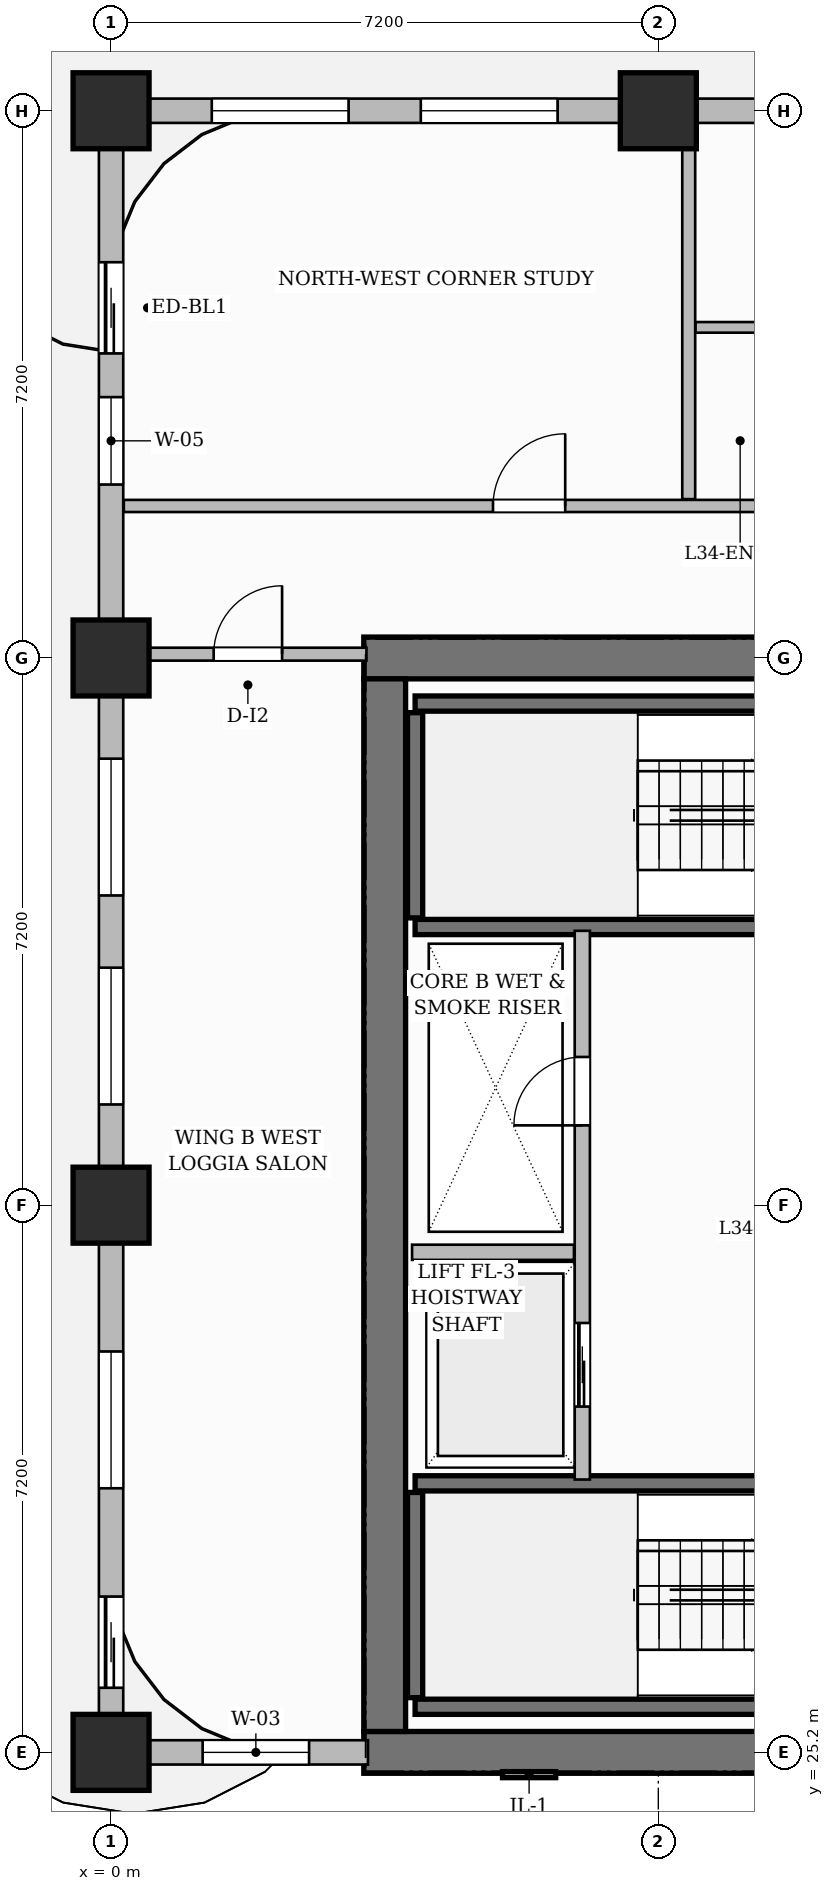
"""IFC4 building model, lengths in metres.
Left out: names, types, materials, properties, quantities, classifications, styles, units other than length and angle.
Written with IfcOpenShell. Run it as: python <this file> out.ifc"""

import sys

from ifc_helpers import new_model, si_unit, direction, frame, frame_2d, origin, origin_2d, place, context, subcontext, project, spatial, rectangle, extrude, source, transform, mapped, element, fill, save


model = new_model("IFC4")
c1 = context("Model", 3, precision=1e-05, world=origin(), true_north=direction((0.0, 1.0)))
c2 = subcontext(c1, "Body", "Model", "MODEL_VIEW")
j1 = project(units=[si_unit("LENGTHUNIT", "METRE"), si_unit("PLANEANGLEUNIT", "RADIAN")], contexts=[c1])
p1 = place(None, origin())
s1 = spatial("IfcSite", under=j1, at=p1, CompositionType="ELEMENT")
p2 = place(p1, origin())
s2 = spatial("IfcBuilding", under=s1, at=p2, CompositionType="ELEMENT")
p3 = place(p2, frame((0.0, 0.0, 137.7)))
s3 = spatial("IfcBuildingStorey", under=s2, at=p3, CompositionType="ELEMENT", Elevation=137.7)
for number, where, z_axis, x_axis in (
    (1, (3.325, 25.2, 0.0), (0.0, 0.0, 1.0), (1.0, 0.0, 0.0)),
    (2, (3.325, 39.6, 0.0), (0.0, 0.0, 1.0), (1.0, 0.0, 0.0)),
):
    element("IfcWall", number, at=place(p3, frame(where, z_axis=z_axis, x_axis=x_axis)), inside=s3, PredefinedType="SHEAR", context=c2, shape_type="SweptSolid", body=[
        extrude(rectangle(XDim=8.35, YDim=0.55, at=frame_2d((4.175, 0.0))), origin(), (0.0, 0.0, 1.0), 3.7),
    ])
p4 = place(p3, frame((3.6, 25.475, 0.0), z_axis=(0.0, 0.0, 1.0), x_axis=(0.0, 1.0, 0.0)))
e3 = element("IfcWall", 3, at=p4, inside=s3, PredefinedType="SHEAR", context=c2, shape_type="SweptSolid", body=[
    extrude(rectangle(XDim=13.85, YDim=0.55, at=frame_2d((6.925, 0.0))), origin(), (0.0, 0.0, 1.0), 3.7),
])
m1 = source(origin(), c2, "Body", "SweptSolid", [
    extrude(rectangle(XDim=1.0, YDim=1.0, at=origin_2d()), origin(), (0.0, 0.0, 1.0), 3.7),
])
for number, where, z_axis, x_axis in (
    (4, (0.0, 25.2, 0.0), (0.0, 0.0, 1.0), (1.0, 0.0, 0.0)),
    (5, (0.0, 32.4, 0.0), (0.0, 0.0, 1.0), (1.0, 0.0, 0.0)),
    (6, (0.0, 39.6, 0.0), (0.0, 0.0, 1.0), (1.0, 0.0, 0.0)),
    (7, (0.0, 46.8, 0.0), (0.0, 0.0, 1.0), (1.0, 0.0, 0.0)),
    (8, (7.2, 46.8, 0.0), (0.0, 0.0, 1.0), (1.0, 0.0, 0.0)),
):
    element("IfcColumn", number, at=place(p3, frame(where, z_axis=z_axis, x_axis=x_axis)), inside=s3, PredefinedType="COLUMN", context=c2, shape_type="MappedRepresentation", body=[
        mapped(m1, transform((0.0, 0.0, 0.0), scale=1.0)),
    ])
p5 = place(p3, frame((4.0, 25.8, 0.0), z_axis=(0.0, 0.0, 1.0), x_axis=(1.0, 0.0, 0.0)))
e9 = element("IfcWall", 9, at=p5, inside=s3, PredefinedType="SHEAR", context=c2, shape_type="SweptSolid", body=[
    extrude(rectangle(XDim=7.1, YDim=0.2, at=frame_2d((3.55, 0.0))), origin(), (0.0, 0.0, 1.0), 3.7),
])
p6 = place(p3, frame((4.0, 25.92, 0.0), z_axis=(0.0, 0.0, 1.0), x_axis=(0.0, 1.0, 0.0)))
e10 = element("IfcWall", 10, at=p6, inside=s3, PredefinedType="SHEAR", context=c2, shape_type="SweptSolid", body=[
    extrude(rectangle(XDim=2.7, YDim=0.2, at=frame_2d((1.35, 0.0))), origin(), (0.0, 0.0, 1.0), 3.7),
])
p7 = place(p3, frame((4.0, 28.74, 0.0), z_axis=(0.0, 0.0, 1.0), x_axis=(1.0, 0.0, 0.0)))
e11 = element("IfcWall", 11, at=p7, inside=s3, PredefinedType="SHEAR", context=c2, shape_type="SweptSolid", body=[
    extrude(rectangle(XDim=7.1, YDim=0.2, at=frame_2d((3.55, 0.0))), origin(), (0.0, 0.0, 1.0), 3.7),
])
p8 = place(p7, frame((5.815, 0.0, 0.0)))
e12 = element("IfcOpeningElement", 12, at=p8, cuts=e11, PredefinedType="OPENING", context=c2, shape_type="SweptSolid", body=[
    extrude(rectangle(XDim=1.05, YDim=2.2, at=frame_2d((0.525, 1.1))), frame((0.0, 0.11, 0.0), z_axis=(0.0, -1.0, 0.0), x_axis=(1.0, 0.0, 0.0)), (0.0, 0.0, 1.0), 0.22),
])
p9 = place(p3, frame((4.0, 39.0, 0.0), z_axis=(0.0, 0.0, 1.0), x_axis=(1.0, 0.0, 0.0)))
e13 = element("IfcWall", 13, at=p9, inside=s3, PredefinedType="SHEAR", context=c2, shape_type="SweptSolid", body=[
    extrude(rectangle(XDim=7.1, YDim=0.2, at=frame_2d((3.55, 0.0))), origin(), (0.0, 0.0, 1.0), 3.7),
])
p10 = place(p3, frame((4.0, 36.18, 0.0), z_axis=(0.0, 0.0, 1.0), x_axis=(0.0, 1.0, 0.0)))
e14 = element("IfcWall", 14, at=p10, inside=s3, PredefinedType="SHEAR", context=c2, shape_type="SweptSolid", body=[
    extrude(rectangle(XDim=2.7, YDim=0.2, at=frame_2d((1.35, 0.0))), origin(), (0.0, 0.0, 1.0), 3.7),
])
p11 = place(p3, frame((4.0, 36.06, 0.0), z_axis=(0.0, 0.0, 1.0), x_axis=(1.0, 0.0, 0.0)))
e15 = element("IfcWall", 15, at=p11, inside=s3, PredefinedType="SHEAR", context=c2, shape_type="SweptSolid", body=[
    extrude(rectangle(XDim=7.1, YDim=0.2, at=frame_2d((3.55, 0.0))), origin(), (0.0, 0.0, 1.0), 3.7),
])
p12 = place(p11, frame((5.815, 0.0, 0.0)))
e16 = element("IfcOpeningElement", 16, at=p12, cuts=e15, PredefinedType="OPENING", context=c2, shape_type="SweptSolid", body=[
    extrude(rectangle(XDim=1.05, YDim=2.2, at=frame_2d((0.525, 1.1))), frame((0.0, 0.11, 0.0), z_axis=(0.0, -1.0, 0.0), x_axis=(1.0, 0.0, 0.0)), (0.0, 0.0, 1.0), 0.22),
])
p13 = place(p3, frame((6.2, 28.79, 0.0), z_axis=(0.0, 0.0, 1.0), x_axis=(0.0, 1.0, 0.0)))
e17 = element("IfcWall", 17, at=p13, inside=s3, PredefinedType="PARTITIONING", context=c2, shape_type="SweptSolid", body=[
    extrude(rectangle(XDim=7.22, YDim=0.2, at=frame_2d((3.61, 0.0))), origin(), (0.0, 0.0, 1.0), 3.45),
])
p14 = place(p13, frame((4.66, 0.0, 0.0)))
e18 = element("IfcOpeningElement", 18, at=p14, cuts=e17, PredefinedType="OPENING", context=c2, shape_type="SweptSolid", body=[
    extrude(rectangle(XDim=0.9, YDim=2.1, at=frame_2d((0.45, 1.05))), frame((0.0, 0.11, 0.0), z_axis=(0.0, -1.0, 0.0), x_axis=(1.0, 0.0, 0.0)), (0.0, 0.0, 1.0), 0.22),
])
p15 = place(p13, frame((0.96, 0.0, 0.0)))
e19 = element("IfcOpeningElement", 19, at=p15, cuts=e17, PredefinedType="OPENING", context=c2, shape_type="SweptSolid", body=[
    extrude(rectangle(XDim=1.1, YDim=2.2, at=frame_2d((0.55, 1.1))), frame((0.0, 0.11, 0.0), z_axis=(0.0, -1.0, 0.0), x_axis=(1.0, 0.0, 0.0)), (0.0, 0.0, 1.0), 0.22),
])
p16 = place(p3, frame((3.96, 31.78, 0.0), z_axis=(0.0, 0.0, 1.0), x_axis=(1.0, 0.0, 0.0)))
e20 = element("IfcWall", 20, at=p16, inside=s3, PredefinedType="PARTITIONING", context=c2, shape_type="SweptSolid", body=[
    extrude(rectangle(XDim=2.13, YDim=0.2, at=frame_2d((1.065, 0.0))), origin(), (0.0, 0.0, 1.0), 3.45),
])
p17 = place(p3, frame((0.24, 39.65, 0.0), z_axis=(0.0, 0.0, 1.0), x_axis=(1.0, 0.0, 0.0)))
e21 = element("IfcWall", 21, at=p17, inside=s3, PredefinedType="PARTITIONING", context=c2, shape_type="SweptSolid", body=[
    extrude(rectangle(XDim=3.12, YDim=0.17, at=frame_2d((1.56, 0.0))), origin(), (0.0, 0.0, 1.0), 3.45),
])
p18 = place(p17, frame((1.11, 0.0, 0.0)))
e22 = element("IfcOpeningElement", 22, at=p18, cuts=e21, PredefinedType="OPENING", context=c2, shape_type="SweptSolid", body=[
    extrude(rectangle(XDim=0.9, YDim=2.15, at=frame_2d((0.45, 1.075))), frame((0.0, 0.095, 0.0), z_axis=(0.0, -1.0, 0.0), x_axis=(1.0, 0.0, 0.0)), (0.0, 0.0, 1.0), 0.19),
])
p19 = place(p3, frame((7.6, 41.69, 0.0), z_axis=(0.0, 0.0, 1.0), x_axis=(0.0, 1.0, 0.0)))
e23 = element("IfcWall", 23, at=p19, inside=s3, PredefinedType="PARTITIONING", context=c2, shape_type="SweptSolid", body=[
    extrude(rectangle(XDim=4.87, YDim=0.17, at=frame_2d((2.435, 0.0))), origin(), (0.0, 0.0, 1.0), 3.45),
])
p20 = place(p3, frame((0.168, 41.6, 0.0), z_axis=(0.0, 0.0, 1.0), x_axis=(1.0, 0.0, 0.0)))
e24 = element("IfcWall", 24, at=p20, inside=s3, PredefinedType="PARTITIONING", context=c2, shape_type="SweptSolid", body=[
    extrude(rectangle(XDim=14.792, YDim=0.16, at=frame_2d((7.396, 0.0))), origin(), (0.0, 0.0, 1.0), 2.935),
])
p21 = place(p20, frame((4.857, 0.0, 0.0)))
e25 = element("IfcOpeningElement", 25, at=p21, cuts=e24, PredefinedType="OPENING", context=c2, shape_type="SweptSolid", body=[
    extrude(rectangle(XDim=0.95, YDim=2.15, at=frame_2d((0.475, 1.075))), frame((0.0, 0.09, 0.0), z_axis=(0.0, -1.0, 0.0), x_axis=(1.0, 0.0, 0.0)), (0.0, 0.0, 1.0), 0.18),
])
p22 = place(p3, frame((7.69, 43.95, 0.0), z_axis=(0.0, 0.0, 1.0), x_axis=(1.0, 0.0, 0.0)))
e26 = element("IfcWall", 26, at=p22, inside=s3, PredefinedType="PARTITIONING", context=c2, shape_type="SweptSolid", body=[
    extrude(rectangle(XDim=2.07, YDim=0.14, at=frame_2d((1.035, 0.0))), origin(), (0.0, 0.0, 1.0), 2.935),
])
p23 = place(p3, frame((0.0, 25.2, 0.0), z_axis=(0.0, 0.0, 1.0), x_axis=(1.0, 0.0, 0.0)))
e27 = element("IfcWall", 27, at=p23, inside=s3, PredefinedType="SOLIDWALL", context=c2, shape_type="SweptSolid", body=[
    extrude(rectangle(XDim=3.38, YDim=0.32, at=frame_2d((1.69, 0.0))), origin(), (0.0, 0.0, 1.0), 3.45),
])
p24 = place(p23, frame((1.205, 0.0, 0.8)))
e28 = element("IfcOpeningElement", 28, at=p24, cuts=e27, PredefinedType="OPENING", context=c2, shape_type="SweptSolid", body=[
    extrude(rectangle(XDim=1.4, YDim=1.85, at=frame_2d((0.7, 0.925))), frame((0.0, 0.17, 0.0), z_axis=(0.0, -1.0, 0.0), x_axis=(1.0, 0.0, 0.0)), (0.0, 0.0, 1.0), 0.34),
])
p25 = place(p3, frame((0.0, 25.25, 0.0), z_axis=(0.0, 0.0, 1.0), x_axis=(0.0, 1.0, 0.0)))
e29 = element("IfcWall", 29, at=p25, inside=s3, PredefinedType="SOLIDWALL", context=c2, shape_type="SweptSolid", body=[
    extrude(rectangle(XDim=21.5, YDim=0.32, at=frame_2d((10.75, 0.0))), origin(), (0.0, 0.0, 1.0), 2.935),
])
p26 = place(p25, frame((18.357, 0.0, 0.0)))
e30 = element("IfcOpeningElement", 30, at=p26, cuts=e29, PredefinedType="OPENING", context=c2, shape_type="SweptSolid", body=[
    extrude(rectangle(XDim=1.2, YDim=2.2, at=frame_2d((0.6, 1.1))), frame((0.0, 0.17, 0.0), z_axis=(0.0, -1.0, 0.0), x_axis=(1.0, 0.0, 0.0)), (0.0, 0.0, 1.0), 0.34),
])
p27 = place(p25, frame((0.8, 0.0, 0.0)))
e31 = element("IfcOpeningElement", 31, at=p27, cuts=e29, PredefinedType="OPENING", context=c2, shape_type="SweptSolid", body=[
    extrude(rectangle(XDim=1.2, YDim=2.2, at=frame_2d((0.6, 1.1))), frame((0.0, 0.17, 0.0), z_axis=(0.0, -1.0, 0.0), x_axis=(1.0, 0.0, 0.0)), (0.0, 0.0, 1.0), 0.34),
])
p28 = place(p25, frame((3.425, 0.0, 0.8)))
e32 = element("IfcOpeningElement", 32, at=p28, cuts=e29, PredefinedType="OPENING", context=c2, shape_type="SweptSolid", body=[
    extrude(rectangle(XDim=1.8, YDim=1.85, at=frame_2d((0.9, 0.925))), frame((0.0, 0.17, 0.0), z_axis=(0.0, -1.0, 0.0), x_axis=(1.0, 0.0, 0.0)), (0.0, 0.0, 1.0), 0.34),
])
p29 = place(p25, frame((8.475, 0.0, 0.8)))
e33 = element("IfcOpeningElement", 33, at=p29, cuts=e29, PredefinedType="OPENING", context=c2, shape_type="SweptSolid", body=[
    extrude(rectangle(XDim=1.8, YDim=1.85, at=frame_2d((0.9, 0.925))), frame((0.0, 0.17, 0.0), z_axis=(0.0, -1.0, 0.0), x_axis=(1.0, 0.0, 0.0)), (0.0, 0.0, 1.0), 0.34),
])
p30 = place(p25, frame((11.225, 0.0, 0.8)))
e34 = element("IfcOpeningElement", 34, at=p30, cuts=e29, PredefinedType="OPENING", context=c2, shape_type="SweptSolid", body=[
    extrude(rectangle(XDim=1.8, YDim=1.85, at=frame_2d((0.9, 0.925))), frame((0.0, 0.17, 0.0), z_axis=(0.0, -1.0, 0.0), x_axis=(1.0, 0.0, 0.0)), (0.0, 0.0, 1.0), 0.34),
])
p31 = place(p25, frame((16.632, 0.0, 0.8)))
e35 = element("IfcOpeningElement", 35, at=p31, cuts=e29, PredefinedType="OPENING", context=c2, shape_type="SweptSolid", body=[
    extrude(rectangle(XDim=1.15, YDim=1.8, at=frame_2d((0.575, 0.9))), frame((0.0, 0.17, 0.0), z_axis=(0.0, -1.0, 0.0), x_axis=(1.0, 0.0, 0.0)), (0.0, 0.0, 1.0), 0.34),
])
p32 = place(p3, frame((0.0, 46.8, 0.0), z_axis=(0.0, 0.0, 1.0), x_axis=(1.0, 0.0, 0.0)))
e36 = element("IfcWall", 36, at=p32, inside=s3, PredefinedType="SOLIDWALL", context=c2, shape_type="SweptSolid", body=[
    extrude(rectangle(XDim=18.0, YDim=0.32, at=frame_2d((9.0, 0.0))), origin(), (0.0, 0.0, 1.0), 2.935),
])
p33 = place(p32, frame((1.325, 0.0, 0.8)))
e37 = element("IfcOpeningElement", 37, at=p33, cuts=e36, PredefinedType="OPENING", context=c2, shape_type="SweptSolid", body=[
    extrude(rectangle(XDim=1.8, YDim=1.85, at=frame_2d((0.9, 0.925))), frame((0.0, 0.17, 0.0), z_axis=(0.0, -1.0, 0.0), x_axis=(1.0, 0.0, 0.0)), (0.0, 0.0, 1.0), 0.34),
])
p34 = place(p32, frame((4.075, 0.0, 0.8)))
e38 = element("IfcOpeningElement", 38, at=p34, cuts=e36, PredefinedType="OPENING", context=c2, shape_type="SweptSolid", body=[
    extrude(rectangle(XDim=1.8, YDim=1.85, at=frame_2d((0.9, 0.925))), frame((0.0, 0.17, 0.0), z_axis=(0.0, -1.0, 0.0), x_axis=(1.0, 0.0, 0.0)), (0.0, 0.0, 1.0), 0.34),
])
p35 = place(p32, frame((8.525, 0.0, 0.8)))
e39 = element("IfcOpeningElement", 39, at=p35, cuts=e36, PredefinedType="OPENING", context=c2, shape_type="SweptSolid", body=[
    extrude(rectangle(XDim=1.8, YDim=1.85, at=frame_2d((0.9, 0.925))), frame((0.0, 0.17, 0.0), z_axis=(0.0, -1.0, 0.0), x_axis=(1.0, 0.0, 0.0)), (0.0, 0.0, 1.0), 0.34),
])
p36 = place(p32, frame((11.275, 0.0, 0.8)))
e40 = element("IfcOpeningElement", 40, at=p36, cuts=e36, PredefinedType="OPENING", context=c2, shape_type="SweptSolid", body=[
    extrude(rectangle(XDim=1.8, YDim=1.85, at=frame_2d((0.9, 0.925))), frame((0.0, 0.17, 0.0), z_axis=(0.0, -1.0, 0.0), x_axis=(1.0, 0.0, 0.0)), (0.0, 0.0, 1.0), 0.34),
])
p37 = place(p32, frame((15.5, 0.0, 0.8)))
e41 = element("IfcOpeningElement", 41, at=p37, cuts=e36, PredefinedType="OPENING", context=c2, shape_type="SweptSolid", body=[
    extrude(rectangle(XDim=1.4, YDim=1.85, at=frame_2d((0.7, 0.925))), frame((0.0, 0.17, 0.0), z_axis=(0.0, -1.0, 0.0), x_axis=(1.0, 0.0, 0.0)), (0.0, 0.0, 1.0), 0.34),
])
m2 = source(origin(), c2, "Body", "SweptSolid", [
    extrude(rectangle(XDim=0.9, YDim=2.1, at=frame_2d((0.45, 1.05))), frame((0.0, 0.025, 0.0), z_axis=(0.0, -1.0, 0.0), x_axis=(1.0, 0.0, 0.0)), (0.0, 0.0, 1.0), 0.05),
])
p38 = place(p14, origin())
e42 = element("IfcDoor", 42, at=p38, inside=s3, OperationType="SINGLE_SWING_LEFT", PredefinedType="DOOR", context=c2, shape_type="MappedRepresentation", body=[
    mapped(m2, transform((0.0, 0.0, 0.0), scale=1.0)),
])
fill(e18, e42)
m3 = source(origin(), c2, "Body", "SweptSolid", [
    extrude(rectangle(XDim=0.9, YDim=2.15, at=frame_2d((0.45, 1.075))), frame((0.0, 0.025, 0.0), z_axis=(0.0, -1.0, 0.0), x_axis=(1.0, 0.0, 0.0)), (0.0, 0.0, 1.0), 0.05),
])
p39 = place(p18, origin())
e43 = element("IfcDoor", 43, at=p39, inside=s3, OperationType="SINGLE_SWING_RIGHT", PredefinedType="DOOR", context=c2, shape_type="MappedRepresentation", body=[
    mapped(m3, transform((0.0, 0.0, 0.0), scale=1.0)),
])
fill(e22, e43)
m4 = source(origin(), c2, "Body", "SweptSolid", [
    extrude(rectangle(XDim=0.95, YDim=2.15, at=frame_2d((0.475, 1.075))), frame((0.0, 0.025, 0.0), z_axis=(0.0, -1.0, 0.0), x_axis=(1.0, 0.0, 0.0)), (0.0, 0.0, 1.0), 0.05),
])
p40 = place(p21, origin())
e44 = element("IfcDoor", 44, at=p40, inside=s3, OperationType="SINGLE_SWING_RIGHT", PredefinedType="DOOR", context=c2, shape_type="MappedRepresentation", body=[
    mapped(m4, transform((0.0, 0.0, 0.0), scale=1.0)),
])
fill(e25, e44)
m5 = source(origin(), c2, "Body", "SweptSolid", [
    extrude(rectangle(XDim=1.1, YDim=2.2, at=frame_2d((0.55, 1.1))), frame((0.0, 0.025, 0.0), z_axis=(0.0, -1.0, 0.0), x_axis=(1.0, 0.0, 0.0)), (0.0, 0.0, 1.0), 0.05),
])
p41 = place(p15, origin())
e45 = element("IfcDoor", 45, at=p41, inside=s3, OperationType="SLIDING_TO_LEFT", PredefinedType="DOOR", context=c2, shape_type="MappedRepresentation", body=[
    mapped(m5, transform((0.0, 0.0, 0.0), scale=1.0)),
])
fill(e19, e45)
m6 = source(origin(), c2, "Body", "SweptSolid", [
    extrude(rectangle(XDim=1.2, YDim=2.2, at=frame_2d((0.6, 1.1))), frame((0.0, 0.025, 0.0), z_axis=(0.0, -1.0, 0.0), x_axis=(1.0, 0.0, 0.0)), (0.0, 0.0, 1.0), 0.05),
])
p42 = place(p26, origin())
e46 = element("IfcDoor", 46, at=p42, inside=s3, OperationType="SLIDING_TO_LEFT", PredefinedType="DOOR", context=c2, shape_type="MappedRepresentation", body=[
    mapped(m6, transform((0.0, 0.0, 0.0), scale=1.0)),
])
fill(e30, e46)
p43 = place(p27, origin())
e47 = element("IfcDoor", 47, at=p43, inside=s3, OperationType="SLIDING_TO_LEFT", PredefinedType="DOOR", context=c2, shape_type="MappedRepresentation", body=[
    mapped(m6, transform((0.0, 0.0, 0.0), scale=1.0)),
])
fill(e31, e47)
m7 = source(origin(), c2, "Body", "SweptSolid", [
    extrude(rectangle(XDim=1.4, YDim=1.85, at=frame_2d((0.7, 0.925))), frame((0.0, 0.03, 0.0), z_axis=(0.0, -1.0, 0.0), x_axis=(1.0, 0.0, 0.0)), (0.0, 0.0, 1.0), 0.06),
])
p44 = place(p24, origin())
e48 = element("IfcWindow", 48, at=p44, inside=s3, PartitioningType="SINGLE_PANEL", PredefinedType="WINDOW", context=c2, shape_type="MappedRepresentation", body=[
    mapped(m7, transform((0.0, 0.0, 0.0), scale=1.0)),
])
fill(e28, e48)
m8 = source(origin(), c2, "Body", "SweptSolid", [
    extrude(rectangle(XDim=1.8, YDim=1.85, at=frame_2d((0.9, 0.925))), frame((0.0, 0.03, 0.0), z_axis=(0.0, -1.0, 0.0), x_axis=(1.0, 0.0, 0.0)), (0.0, 0.0, 1.0), 0.06),
])
p45 = place(p28, origin())
e49 = element("IfcWindow", 49, at=p45, inside=s3, PartitioningType="DOUBLE_PANEL_VERTICAL", PredefinedType="WINDOW", context=c2, shape_type="MappedRepresentation", body=[
    mapped(m8, transform((0.0, 0.0, 0.0), scale=1.0)),
])
fill(e32, e49)
p46 = place(p29, origin())
e50 = element("IfcWindow", 50, at=p46, inside=s3, PartitioningType="DOUBLE_PANEL_VERTICAL", PredefinedType="WINDOW", context=c2, shape_type="MappedRepresentation", body=[
    mapped(m8, transform((0.0, 0.0, 0.0), scale=1.0)),
])
fill(e33, e50)
p47 = place(p30, origin())
e51 = element("IfcWindow", 51, at=p47, inside=s3, PartitioningType="DOUBLE_PANEL_VERTICAL", PredefinedType="WINDOW", context=c2, shape_type="MappedRepresentation", body=[
    mapped(m8, transform((0.0, 0.0, 0.0), scale=1.0)),
])
fill(e34, e51)
m9 = source(origin(), c2, "Body", "SweptSolid", [
    extrude(rectangle(XDim=1.15, YDim=1.8, at=frame_2d((0.575, 0.9))), frame((0.0, 0.03, 0.0), z_axis=(0.0, -1.0, 0.0), x_axis=(1.0, 0.0, 0.0)), (0.0, 0.0, 1.0), 0.06),
])
p48 = place(p31, origin())
e52 = element("IfcWindow", 52, at=p48, inside=s3, PartitioningType="SINGLE_PANEL", PredefinedType="WINDOW", context=c2, shape_type="MappedRepresentation", body=[
    mapped(m9, transform((0.0, 0.0, 0.0), scale=1.0)),
])
fill(e35, e52)
p49 = place(p33, origin())
e53 = element("IfcWindow", 53, at=p49, inside=s3, PartitioningType="DOUBLE_PANEL_VERTICAL", PredefinedType="WINDOW", context=c2, shape_type="MappedRepresentation", body=[
    mapped(m8, transform((0.0, 0.0, 0.0), scale=1.0)),
])
fill(e37, e53)
p50 = place(p34, origin())
e54 = element("IfcWindow", 54, at=p50, inside=s3, PartitioningType="DOUBLE_PANEL_VERTICAL", PredefinedType="WINDOW", context=c2, shape_type="MappedRepresentation", body=[
    mapped(m8, transform((0.0, 0.0, 0.0), scale=1.0)),
])
fill(e38, e54)
save(model, sys.argv[1])
